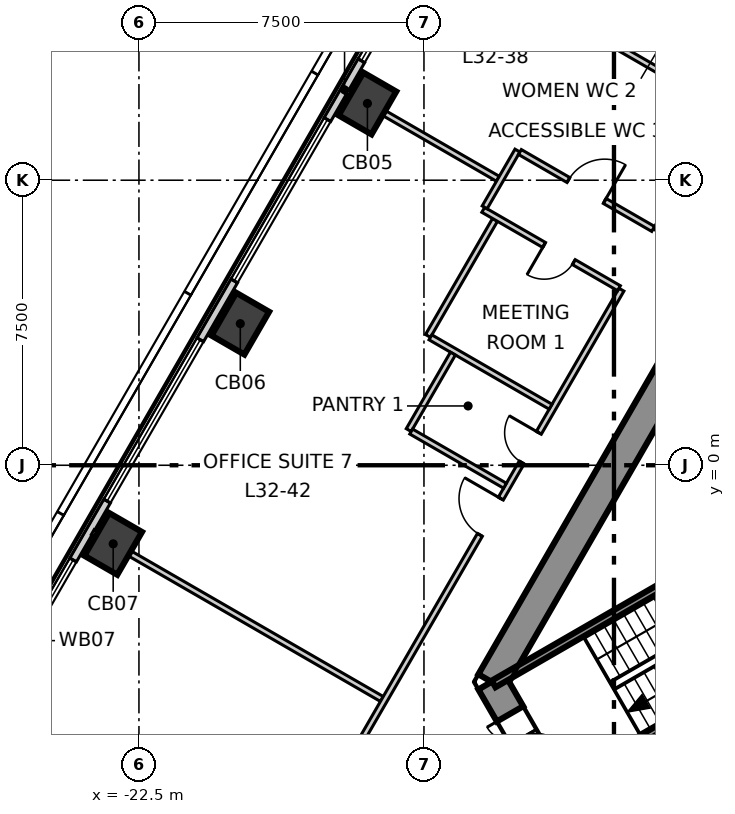
"""IFC4 building model, lengths in metres.
Left out: names, types, materials, properties, quantities, classifications, styles, units other than length and angle.
Written with IfcOpenShell. Run it as: python <this file> out.ifc"""

import sys

from ifc_helpers import new_model, si_unit, direction, frame, frame_2d, origin, origin_2d, place, context, subcontext, project, spatial, polyline, rectangle, outline, extrude, element, fill, save


model = new_model("IFC4")
c1 = context("Model", 3, precision=1e-05, world=origin(), true_north=direction((0.0, 1.0)))
c2 = subcontext(c1, "Body", "Model", "MODEL_VIEW")
j1 = project(units=[si_unit("LENGTHUNIT", "METRE"), si_unit("PLANEANGLEUNIT", "RADIAN")], contexts=[c1])
p1 = place(None, origin())
s1 = spatial("IfcSite", under=j1, at=p1, CompositionType="ELEMENT")
p2 = place(p1, origin())
s2 = spatial("IfcBuilding", under=s1, at=p2, CompositionType="ELEMENT")
p3 = place(p2, frame((0.0, 0.0, 140.3)))
s3 = spatial("IfcBuildingStorey", under=s2, at=p3, CompositionType="ELEMENT", Elevation=140.3)
p4 = place(p3, frame((-1.674, 14.3, -0.3), z_axis=(0.0, 0.0, 1.0), x_axis=(-0.499995765644, -0.866027848477, 0.0)))
e1 = element("IfcWall", 1, at=p4, inside=s3, PredefinedType="SHEAR", context=c2, shape_type="SweptSolid", body=[
    extrude(outline(polyline([(-0.231, -0.4), (1.732, -0.4), (3.695, -0.4), (5.658, -0.4), (7.621, -0.4), (9.584, -0.4), (11.547, -0.4), (13.51, -0.4), (15.473, -0.4), (17.436, -0.4), (19.399, -0.4), (21.362, -0.4), (23.325, -0.4), (22.863, 0.4), (20.977, 0.4), (19.091, 0.4), (17.205, 0.4), (15.319, 0.4), (13.433, 0.4), (11.547, 0.4), (9.661, 0.4), (7.775, 0.4), (5.889, 0.4), (4.003, 0.4), (2.117, 0.4), (0.231, 0.4), (-0.231, -0.4)])), origin(), (0.0, 0.0, 1.0), 4.0),
])
p5 = place(p4, frame((10.997, 0.0, 0.3)))
e2 = element("IfcOpeningElement", 2, at=p5, cuts=e1, PredefinedType="OPENING", context=c2, shape_type="SweptSolid", body=[
    extrude(rectangle(XDim=1.1, YDim=2.1, at=frame_2d((0.55, 1.05))), frame((0.0, 0.41, 0.0), z_axis=(0.0, -1.0, 0.0), x_axis=(1.0, 0.0, 0.0)), (0.0, 0.0, 1.0), 0.82),
])
p6 = place(p4, frame((4.474, 0.0, 0.3)))
e3 = element("IfcOpeningElement", 3, at=p6, cuts=e1, PredefinedType="OPENING", context=c2, shape_type="SweptSolid", body=[
    extrude(rectangle(XDim=0.9, YDim=2.1, at=frame_2d((0.45, 1.05))), frame((0.0, 0.41, 0.0), z_axis=(0.0, -1.0, 0.0), x_axis=(1.0, 0.0, 0.0)), (0.0, 0.0, 1.0), 0.82),
])
p7 = place(p3, frame((-13.221, -5.7, -0.3), z_axis=(0.0, 0.0, 1.0), x_axis=(0.49987182685, -0.866099391942, 0.0)))
e4 = element("IfcWall", 4, at=p7, inside=s3, PredefinedType="SHEAR", context=c2, shape_type="SweptSolid", body=[
    extrude(outline(polyline([(-0.231, -0.4), (1.674, -0.4), (3.579, -0.4), (3.118, 0.4), (1.674, 0.4), (0.231, 0.4), (-0.231, -0.4)])), origin(), (0.0, 0.0, 1.0), 4.0),
])
p8 = place(p7, frame((0.974, 0.0, 0.3)))
e5 = element("IfcOpeningElement", 5, at=p8, cuts=e4, PredefinedType="OPENING", context=c2, shape_type="SweptSolid", body=[
    extrude(rectangle(XDim=1.4, YDim=2.1, at=frame_2d((0.7, 1.05))), frame((0.0, 0.41, 0.0), z_axis=(0.0, -1.0, 0.0), x_axis=(1.0, 0.0, 0.0)), (0.0, 0.0, 1.0), 0.82),
])
for number, where, z_axis, x_axis in (
    (6, (-16.488, 9.52, -0.3), (0.0, 0.0, 1.0), (0.5, 0.866, 0.0)),
    (7, (-19.833, 3.726, -0.3), (0.0, 0.0, 1.0), (0.5, 0.866, 0.0)),
    (8, (-23.178, -2.068, -0.3), (0.0, 0.0, 1.0), (0.5, 0.866, 0.0)),
):
    element("IfcColumn", number, at=place(p3, frame(where, z_axis=z_axis, x_axis=x_axis)), inside=s3, PredefinedType="COLUMN", context=c2, shape_type="SweptSolid", body=[
        extrude(rectangle(XDim=1.3, YDim=1.0, at=origin_2d()), origin(), (0.0, 0.0, 1.0), 4.0),
    ])
p9 = place(p3, frame((-3.063, 34.172, 0.0), z_axis=(0.0, 0.0, 1.0), x_axis=(-0.500008098571, -0.866020728022, 0.0)))
e9 = element("IfcWall", 9, at=p9, inside=s3, PredefinedType="ELEMENTEDWALL", context=c2, shape_type="SweptSolid", body=[
    extrude(rectangle(XDim=56.105, YDim=0.2, at=frame_2d((28.052, 0.0))), origin(), (0.0, 0.0, 1.0), 3.7),
])
p10 = place(p9, frame((2.197, 0.0, 0.9)))
e10 = element("IfcOpeningElement", 10, at=p10, cuts=e9, PredefinedType="OPENING", context=c2, shape_type="SweptSolid", body=[
    extrude(rectangle(XDim=4.9, YDim=2.5, at=frame_2d((2.45, 1.25))), frame((0.0, 0.11, 0.0), z_axis=(0.0, -1.0, 0.0), x_axis=(1.0, 0.0, 0.0)), (0.0, 0.0, 1.0), 0.22),
])
p11 = place(p9, frame((8.887, 0.0, 0.9)))
e11 = element("IfcOpeningElement", 11, at=p11, cuts=e9, PredefinedType="OPENING", context=c2, shape_type="SweptSolid", body=[
    extrude(rectangle(XDim=4.9, YDim=2.5, at=frame_2d((2.45, 1.25))), frame((0.0, 0.11, 0.0), z_axis=(0.0, -1.0, 0.0), x_axis=(1.0, 0.0, 0.0)), (0.0, 0.0, 1.0), 0.22),
])
p12 = place(p9, frame((15.577, 0.0, 0.9)))
e12 = element("IfcOpeningElement", 12, at=p12, cuts=e9, PredefinedType="OPENING", context=c2, shape_type="SweptSolid", body=[
    extrude(rectangle(XDim=4.9, YDim=2.5, at=frame_2d((2.45, 1.25))), frame((0.0, 0.11, 0.0), z_axis=(0.0, -1.0, 0.0), x_axis=(1.0, 0.0, 0.0)), (0.0, 0.0, 1.0), 0.22),
])
p13 = place(p9, frame((22.267, 0.0, 0.9)))
e13 = element("IfcOpeningElement", 13, at=p13, cuts=e9, PredefinedType="OPENING", context=c2, shape_type="SweptSolid", body=[
    extrude(rectangle(XDim=4.9, YDim=2.5, at=frame_2d((2.45, 1.25))), frame((0.0, 0.11, 0.0), z_axis=(0.0, -1.0, 0.0), x_axis=(1.0, 0.0, 0.0)), (0.0, 0.0, 1.0), 0.22),
])
p14 = place(p9, frame((28.957, 0.0, 0.9)))
e14 = element("IfcOpeningElement", 14, at=p14, cuts=e9, PredefinedType="OPENING", context=c2, shape_type="SweptSolid", body=[
    extrude(rectangle(XDim=4.9, YDim=2.5, at=frame_2d((2.45, 1.25))), frame((0.0, 0.11, 0.0), z_axis=(0.0, -1.0, 0.0), x_axis=(1.0, 0.0, 0.0)), (0.0, 0.0, 1.0), 0.22),
])
p15 = place(p9, frame((35.647, 0.0, 0.9)))
e15 = element("IfcOpeningElement", 15, at=p15, cuts=e9, PredefinedType="OPENING", context=c2, shape_type="SweptSolid", body=[
    extrude(rectangle(XDim=4.9, YDim=2.5, at=frame_2d((2.45, 1.25))), frame((0.0, 0.11, 0.0), z_axis=(0.0, -1.0, 0.0), x_axis=(1.0, 0.0, 0.0)), (0.0, 0.0, 1.0), 0.22),
])
p16 = place(p9, frame((42.337, 0.0, 0.9)))
e16 = element("IfcOpeningElement", 16, at=p16, cuts=e9, PredefinedType="OPENING", context=c2, shape_type="SweptSolid", body=[
    extrude(rectangle(XDim=4.9, YDim=2.5, at=frame_2d((2.45, 1.25))), frame((0.0, 0.11, 0.0), z_axis=(0.0, -1.0, 0.0), x_axis=(1.0, 0.0, 0.0)), (0.0, 0.0, 1.0), 0.22),
])
p17 = place(p9, frame((49.027, 0.0, 0.9)))
e17 = element("IfcOpeningElement", 17, at=p17, cuts=e9, PredefinedType="OPENING", context=c2, shape_type="SweptSolid", body=[
    extrude(rectangle(XDim=4.9, YDim=2.5, at=frame_2d((2.45, 1.25))), frame((0.0, 0.11, 0.0), z_axis=(0.0, -1.0, 0.0), x_axis=(1.0, 0.0, 0.0)), (0.0, 0.0, 1.0), 0.22),
])
p18 = place(p3, frame((-23.715, -1.758, 0.0), z_axis=(0.0, 0.0, 1.0), x_axis=(0.866033311227, -0.499986303657, 0.0)))
e18 = element("IfcWall", 18, at=p18, inside=s3, PredefinedType="PARTITIONING", context=c2, shape_type="SweptSolid", body=[
    extrude(rectangle(XDim=8.784, YDim=0.15, at=frame_2d((4.392, 0.0))), origin(), (0.0, 0.0, 1.0), 3.7),
])
p19 = place(p3, frame((-18.631, -10.669, 0.0), z_axis=(0.0, 0.0, 1.0), x_axis=(0.50004165882, 0.866001350717, 0.0)))
e19 = element("IfcWall", 19, at=p19, inside=s3, PredefinedType="PARTITIONING", context=c2, shape_type="SweptSolid", body=[
    extrude(rectangle(XDim=17.655, YDim=0.15, at=frame_2d((8.827, 0.0))), origin(), (0.0, 0.0, 1.0), 3.7),
])
p20 = place(p19, frame((10.206, 0.0, 0.0)))
e20 = element("IfcOpeningElement", 20, at=p20, cuts=e19, PredefinedType="OPENING", context=c2, shape_type="SweptSolid", body=[
    extrude(rectangle(XDim=1.1, YDim=2.1, at=frame_2d((0.55, 1.05))), frame((0.0, 0.085, 0.0), z_axis=(0.0, -1.0, 0.0), x_axis=(1.0, 0.0, 0.0)), (0.0, 0.0, 1.0), 0.17),
])
p21 = place(p19, frame((12.406, 0.0, 0.0)))
e21 = element("IfcOpeningElement", 21, at=p21, cuts=e19, PredefinedType="OPENING", context=c2, shape_type="SweptSolid", body=[
    extrude(rectangle(XDim=0.9, YDim=2.1, at=frame_2d((0.45, 1.05))), frame((0.0, 0.085, 0.0), z_axis=(0.0, -1.0, 0.0), x_axis=(1.0, 0.0, 0.0)), (0.0, 0.0, 1.0), 0.17),
])
p22 = place(p19, frame((1.925, 0.0, 0.0)))
e22 = element("IfcOpeningElement", 22, at=p22, cuts=e19, PredefinedType="OPENING", context=c2, shape_type="SweptSolid", body=[
    extrude(rectangle(XDim=1.1, YDim=2.1, at=frame_2d((0.55, 1.05))), frame((0.0, 0.085, 0.0), z_axis=(0.0, -1.0, 0.0), x_axis=(1.0, 0.0, 0.0)), (0.0, 0.0, 1.0), 0.17),
])
p23 = place(p3, frame((-8.902, 6.181, 0.0), z_axis=(0.0, 0.0, 1.0), x_axis=(0.499992688384, 0.866029625107, 0.0)))
e23 = element("IfcWall", 23, at=p23, inside=s3, PredefinedType="PARTITIONING", context=c2, shape_type="SweptSolid", body=[
    extrude(rectangle(XDim=17.804, YDim=0.15, at=frame_2d((8.902, 0.0))), origin(), (0.0, 0.0, 1.0), 3.7),
])
p24 = place(p23, frame((14.554, 0.0, 0.0)))
e24 = element("IfcOpeningElement", 24, at=p24, cuts=e23, PredefinedType="OPENING", context=c2, shape_type="SweptSolid", body=[
    extrude(rectangle(XDim=1.1, YDim=2.1, at=frame_2d((0.55, 1.05))), frame((0.0, 0.085, 0.0), z_axis=(0.0, -1.0, 0.0), x_axis=(1.0, 0.0, 0.0)), (0.0, 0.0, 1.0), 0.17),
])
p25 = place(p23, frame((10.428, 0.0, 0.0)))
e25 = element("IfcOpeningElement", 25, at=p25, cuts=e23, PredefinedType="OPENING", context=c2, shape_type="SweptSolid", body=[
    extrude(rectangle(XDim=0.9, YDim=2.1, at=frame_2d((0.45, 1.05))), frame((0.0, 0.085, 0.0), z_axis=(0.0, -1.0, 0.0), x_axis=(1.0, 0.0, 0.0)), (0.0, 0.0, 1.0), 0.17),
])
p26 = place(p23, frame((7.228, 0.0, 0.0)))
e26 = element("IfcOpeningElement", 26, at=p26, cuts=e23, PredefinedType="OPENING", context=c2, shape_type="SweptSolid", body=[
    extrude(rectangle(XDim=0.9, YDim=2.1, at=frame_2d((0.45, 1.05))), frame((0.0, 0.085, 0.0), z_axis=(0.0, -1.0, 0.0), x_axis=(1.0, 0.0, 0.0)), (0.0, 0.0, 1.0), 0.17),
])
p27 = place(p23, frame((4.428, 0.0, 0.0)))
e27 = element("IfcOpeningElement", 27, at=p27, cuts=e23, PredefinedType="OPENING", context=c2, shape_type="SweptSolid", body=[
    extrude(rectangle(XDim=1.0, YDim=2.1, at=frame_2d((0.5, 1.05))), frame((0.0, 0.085, 0.0), z_axis=(0.0, -1.0, 0.0), x_axis=(1.0, 0.0, 0.0)), (0.0, 0.0, 1.0), 0.17),
])
p28 = place(p3, frame((-17.025, 9.83, 0.0), z_axis=(0.0, 0.0, 1.0), x_axis=(0.866032154434, -0.49998830735, 0.0)))
e28 = element("IfcWall", 28, at=p28, inside=s3, PredefinedType="PARTITIONING", context=c2, shape_type="SweptSolid", body=[
    extrude(rectangle(XDim=4.584, YDim=0.15, at=frame_2d((2.292, 0.0))), origin(), (0.0, 0.0, 1.0), 3.2),
])
p29 = place(p3, frame((-14.894, 3.403, 0.0), z_axis=(0.0, 0.0, 1.0), x_axis=(0.500064136673, 0.865988371292, 0.0)))
e29 = element("IfcWall", 29, at=p29, inside=s3, PredefinedType="PARTITIONING", context=c2, shape_type="SweptSolid", body=[
    extrude(rectangle(XDim=3.525, YDim=0.15, at=frame_2d((1.763, 0.0))), origin(), (0.0, 0.0, 1.0), 3.7),
])
p30 = place(p3, frame((-14.829, 3.366, 0.0), z_axis=(0.0, 0.0, 1.0), x_axis=(0.866040790738, -0.499973348067, 0.0)))
e30 = element("IfcWall", 30, at=p30, inside=s3, PredefinedType="PARTITIONING", context=c2, shape_type="SweptSolid", body=[
    extrude(rectangle(XDim=3.65, YDim=0.15, at=frame_2d((1.825, 0.0))), origin(), (0.0, 0.0, 1.0), 3.7),
])
p31 = place(p3, frame((-15.401, 0.925, 0.0), z_axis=(0.0, 0.0, 1.0), x_axis=(0.500216356891, 0.865900454035, 0.0)))
e31 = element("IfcWall", 31, at=p31, inside=s3, PredefinedType="PARTITIONING", context=c2, shape_type="SweptSolid", body=[
    extrude(rectangle(XDim=2.325, YDim=0.15, at=frame_2d((1.162, 0.0))), origin(), (0.0, 0.0, 1.0), 3.7),
])
p32 = place(p3, frame((-15.336, 0.887, 0.0), z_axis=(0.0, 0.0, 1.0), x_axis=(0.866004402611, -0.500036373335, 0.0)))
e32 = element("IfcWall", 32, at=p32, inside=s3, PredefinedType="PARTITIONING", context=c2, shape_type="SweptSolid", body=[
    extrude(rectangle(XDim=2.85, YDim=0.15, at=frame_2d((1.425, 0.0))), origin(), (0.0, 0.0, 1.0), 3.7),
])
p33 = place(p3, frame((-13.44, 6.721, 0.0), z_axis=(0.0, 0.0, 1.0), x_axis=(0.865997263264, -0.500048737644, 0.0)))
e33 = element("IfcWall", 33, at=p33, inside=s3, PredefinedType="PARTITIONING", context=c2, shape_type="SweptSolid", body=[
    extrude(rectangle(XDim=4.124, YDim=0.15, at=frame_2d((2.062, 0.0))), origin(), (0.0, 0.0, 1.0), 3.7),
])
p34 = place(p33, frame((1.85, 0.0, 0.0)))
e34 = element("IfcOpeningElement", 34, at=p34, cuts=e33, PredefinedType="OPENING", context=c2, shape_type="SweptSolid", body=[
    extrude(rectangle(XDim=0.9, YDim=2.1, at=frame_2d((0.45, 1.05))), frame((0.0, 0.085, 0.0), z_axis=(0.0, -1.0, 0.0), x_axis=(1.0, 0.0, 0.0)), (0.0, 0.0, 1.0), 0.17),
])
p35 = place(p3, frame((-13.403, 6.786, 0.0), z_axis=(0.0, 0.0, 1.0), x_axis=(0.500171514983, 0.865926356915, 0.0)))
e35 = element("IfcWall", 35, at=p35, inside=s3, PredefinedType="PARTITIONING", context=c2, shape_type="SweptSolid", body=[
    extrude(rectangle(XDim=1.726, YDim=0.15, at=frame_2d((0.863, 0.0))), origin(), (0.0, 0.0, 1.0), 3.7),
])
p36 = place(p3, frame((-12.475, 8.242, 0.0), z_axis=(0.0, 0.0, 1.0), x_axis=(0.866060059865, -0.499939969103, 0.0)))
e36 = element("IfcWall", 36, at=p36, inside=s3, PredefinedType="PARTITIONING", context=c2, shape_type="SweptSolid", body=[
    extrude(rectangle(XDim=4.048, YDim=0.15, at=frame_2d((2.024, 0.0))), origin(), (0.0, 0.0, 1.0), 3.7),
])
p37 = place(p36, frame((1.475, 0.0, 0.0)))
e37 = element("IfcOpeningElement", 37, at=p37, cuts=e36, PredefinedType="OPENING", context=c2, shape_type="SweptSolid", body=[
    extrude(rectangle(XDim=1.1, YDim=2.1, at=frame_2d((0.55, 1.05))), frame((0.0, 0.085, 0.0), z_axis=(0.0, -1.0, 0.0), x_axis=(1.0, 0.0, 0.0)), (0.0, 0.0, 1.0), 0.17),
])
p38 = place(p3, frame((-10.116, 11.129, 0.0), z_axis=(0.0, 0.0, 1.0), x_axis=(0.866061862632, -0.499936846106, 0.0)))
e38 = element("IfcWall", 38, at=p38, inside=s3, PredefinedType="PARTITIONING", context=c2, shape_type="SweptSolid", body=[
    extrude(rectangle(XDim=3.45, YDim=0.15, at=frame_2d((1.725, 0.0))), origin(), (0.0, 0.0, 1.0), 3.7),
])
p39 = place(p3, frame((-13.167, -5.754, 0.0), z_axis=(0.0, 0.0, 1.0), x_axis=(0.866060938598, 0.499938446846, 0.0)))
e39 = element("IfcWall", 39, at=p39, inside=s3, PredefinedType="SOLIDWALL", context=c2, shape_type="SweptSolid", body=[
    extrude(rectangle(XDim=7.665, YDim=0.2, at=frame_2d((3.832, 0.0))), origin(), (0.0, 0.0, 1.0), 3.7),
])
p40 = place(p3, frame((-11.567, -8.526, 0.0), z_axis=(0.0, 0.0, 1.0), x_axis=(0.866005769735, 0.50003400563, 0.0)))
e40 = element("IfcWall", 40, at=p40, inside=s3, PredefinedType="SOLIDWALL", context=c2, shape_type="SweptSolid", body=[
    extrude(rectangle(XDim=7.665, YDim=0.2, at=frame_2d((3.833, 0.0))), origin(), (0.0, 0.0, 1.0), 3.7),
])
p41 = place(p13, origin())
e41 = element("IfcWindow", 41, at=p41, inside=s3, PartitioningType="SINGLE_PANEL", PredefinedType="WINDOW", context=c2, shape_type="SweptSolid", body=[
    extrude(rectangle(XDim=4.9, YDim=2.5, at=frame_2d((2.45, 1.25))), frame((0.0, 0.03, 0.0), z_axis=(0.0, -1.0, 0.0), x_axis=(1.0, 0.0, 0.0)), (0.0, 0.0, 1.0), 0.06),
])
fill(e13, e41)
p42 = place(p14, origin())
e42 = element("IfcWindow", 42, at=p42, inside=s3, PartitioningType="SINGLE_PANEL", PredefinedType="WINDOW", context=c2, shape_type="SweptSolid", body=[
    extrude(rectangle(XDim=4.9, YDim=2.5, at=frame_2d((2.45, 1.25))), frame((0.0, 0.03, 0.0), z_axis=(0.0, -1.0, 0.0), x_axis=(1.0, 0.0, 0.0)), (0.0, 0.0, 1.0), 0.06),
])
fill(e14, e42)
p43 = place(p15, origin())
e43 = element("IfcWindow", 43, at=p43, inside=s3, PartitioningType="SINGLE_PANEL", PredefinedType="WINDOW", context=c2, shape_type="SweptSolid", body=[
    extrude(rectangle(XDim=4.9, YDim=2.5, at=frame_2d((2.45, 1.25))), frame((0.0, 0.03, 0.0), z_axis=(0.0, -1.0, 0.0), x_axis=(1.0, 0.0, 0.0)), (0.0, 0.0, 1.0), 0.06),
])
fill(e15, e43)
p44 = place(p16, origin())
e44 = element("IfcWindow", 44, at=p44, inside=s3, PartitioningType="SINGLE_PANEL", PredefinedType="WINDOW", context=c2, shape_type="SweptSolid", body=[
    extrude(rectangle(XDim=4.9, YDim=2.5, at=frame_2d((2.45, 1.25))), frame((0.0, 0.03, 0.0), z_axis=(0.0, -1.0, 0.0), x_axis=(1.0, 0.0, 0.0)), (0.0, 0.0, 1.0), 0.06),
])
fill(e16, e44)
p45 = place(p37, origin())
e45 = element("IfcDoor", 45, at=p45, inside=s3, OperationType="SINGLE_SWING_LEFT", PredefinedType="DOOR", context=c2, shape_type="SweptSolid", body=[
    extrude(rectangle(XDim=1.1, YDim=2.1, at=frame_2d((0.55, 1.05))), frame((0.0, 0.025, 0.0), z_axis=(0.0, -1.0, 0.0), x_axis=(1.0, 0.0, 0.0)), (0.0, 0.0, 1.0), 0.05),
])
fill(e37, e45)
p46 = place(p20, origin())
e46 = element("IfcDoor", 46, at=p46, inside=s3, OperationType="SINGLE_SWING_LEFT", PredefinedType="DOOR", context=c2, shape_type="SweptSolid", body=[
    extrude(rectangle(XDim=1.1, YDim=2.1, at=frame_2d((0.55, 1.05))), frame((0.0, 0.025, 0.0), z_axis=(0.0, -1.0, 0.0), x_axis=(1.0, 0.0, 0.0)), (0.0, 0.0, 1.0), 0.05),
])
fill(e20, e46)
p47 = place(p34, origin())
e47 = element("IfcDoor", 47, at=p47, inside=s3, OperationType="SINGLE_SWING_LEFT", PredefinedType="DOOR", context=c2, shape_type="SweptSolid", body=[
    extrude(rectangle(XDim=0.9, YDim=2.1, at=frame_2d((0.45, 1.05))), frame((0.0, 0.025, 0.0), z_axis=(0.0, -1.0, 0.0), x_axis=(1.0, 0.0, 0.0)), (0.0, 0.0, 1.0), 0.05),
])
fill(e34, e47)
p48 = place(p21, origin())
e48 = element("IfcDoor", 48, at=p48, inside=s3, OperationType="SINGLE_SWING_LEFT", PredefinedType="DOOR", context=c2, shape_type="SweptSolid", body=[
    extrude(rectangle(XDim=0.9, YDim=2.1, at=frame_2d((0.45, 1.05))), frame((0.0, 0.025, 0.0), z_axis=(0.0, -1.0, 0.0), x_axis=(1.0, 0.0, 0.0)), (0.0, 0.0, 1.0), 0.05),
])
fill(e21, e48)
p49 = place(p8, origin())
e49 = element("IfcDoor", 49, at=p49, inside=s3, OperationType="DOUBLE_DOOR_SINGLE_SWING", PredefinedType="DOOR", context=c2, shape_type="SweptSolid", body=[
    extrude(rectangle(XDim=1.4, YDim=2.1, at=frame_2d((0.7, 1.05))), frame((0.0, 0.025, 0.0), z_axis=(0.0, -1.0, 0.0), x_axis=(1.0, 0.0, 0.0)), (0.0, 0.0, 1.0), 0.05),
])
fill(e5, e49)
save(model, sys.argv[1])
